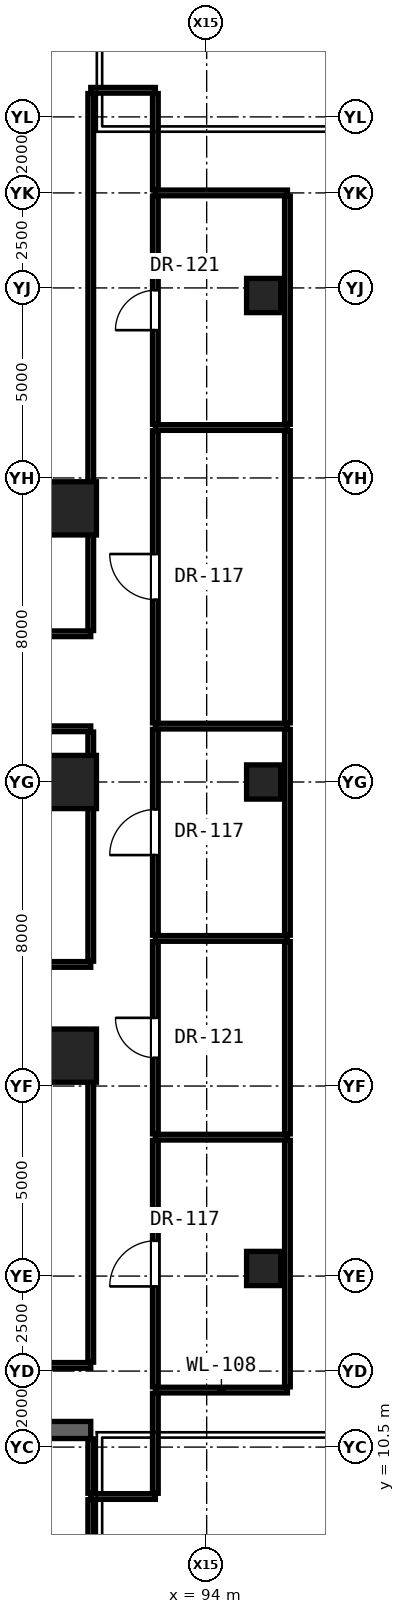
"""IFC4 building model, lengths in metres.
Left out: names, types, materials, properties, quantities, classifications, styles, units other than length and angle.
Written with IfcOpenShell. Run it as: python <this file> out.ifc"""

import sys

from ifc_helpers import new_model, si_unit, direction, frame, frame_2d, origin, origin_2d, place, context, subcontext, project, spatial, rectangle, hollow_rectangle, extrude, element, fill, save


model = new_model("IFC4")
c1 = context("Model", 3, precision=1e-05, world=origin(), true_north=direction((0.0, 1.0)))
c2 = subcontext(c1, "Body", "Model", "MODEL_VIEW")
j1 = project(units=[si_unit("LENGTHUNIT", "METRE"), si_unit("PLANEANGLEUNIT", "RADIAN")], contexts=[c1])
p1 = place(None, origin())
s1 = spatial("IfcSite", under=j1, at=p1, CompositionType="ELEMENT")
p2 = place(p1, origin())
s2 = spatial("IfcBuilding", under=s1, at=p2, CompositionType="ELEMENT")
p3 = place(p2, frame((0.0, 0.0, 13.8)))
s3 = spatial("IfcBuildingStorey", under=s2, at=p3, CompositionType="ELEMENT", Elevation=13.8)
for number, where, z_axis, x_axis in (
    (1, (90.4, 20.8, 0.0), (0.0, 0.0, 1.0), (1.0, 0.0, 0.0)),
    (2, (90.4, 28.0, 0.0), (0.0, 0.0, 1.0), (1.0, 0.0, 0.0)),
    (3, (90.4, 35.2, 0.0), (0.0, 0.0, 1.0), (1.0, 0.0, 0.0)),
):
    element("IfcColumn", number, at=place(p3, frame(where, z_axis=z_axis, x_axis=x_axis)), inside=s3, PredefinedType="COLUMN", context=c2, shape_type="SweptSolid", body=[
        extrude(hollow_rectangle(XDim=1.4, YDim=1.4, WallThickness=0.08, at=origin_2d()), origin(), (0.0, 0.0, 1.0), 4.3),
    ])
for number, where, z_axis, x_axis in (
    (4, (95.5, 15.2, 0.0), (0.0, 0.0, 1.0), (1.0, 0.0, 0.0)),
    (5, (95.5, 28.0, 0.0), (0.0, 0.0, 1.0), (1.0, 0.0, 0.0)),
    (6, (95.5, 40.8, 0.0), (0.0, 0.0, 1.0), (1.0, 0.0, 0.0)),
):
    element("IfcColumn", number, at=place(p3, frame(where, z_axis=z_axis, x_axis=x_axis)), inside=s3, PredefinedType="COLUMN", context=c2, shape_type="SweptSolid", body=[
        extrude(rectangle(XDim=0.9, YDim=0.9, at=origin_2d()), origin(), (0.0, 0.0, 1.0), 4.3),
    ])
p4 = place(p3, frame((90.95, 9.2, 0.0), z_axis=(0.0, 0.0, 1.0), x_axis=(1.0, 0.0, 0.0)))
e7 = element("IfcWall", 7, at=p4, inside=s3, PredefinedType="PARTITIONING", context=c2, shape_type="SweptSolid", body=[
    extrude(rectangle(XDim=1.7, YDim=0.15, at=frame_2d((0.85, 0.0))), origin(), (0.0, 0.0, 1.0), 3.65),
])
p5 = place(p3, frame((61.8, 10.95, 0.0), z_axis=(0.0, 0.0, 1.0), x_axis=(1.0, 0.0, 0.0)))
e8 = element("IfcWall", 8, at=p5, inside=s3, PredefinedType="SHEAR", context=c2, shape_type="SweptSolid", body=[
    extrude(rectangle(XDim=29.15, YDim=0.45, at=frame_2d((14.575, 0.0))), origin(), (0.0, 0.0, 1.0), 3.65),
])
p6 = place(p5, frame((7.57, 0.0, 0.0)))
e9 = element("IfcOpeningElement", 9, at=p6, cuts=e8, PredefinedType="OPENING", context=c2, shape_type="SweptSolid", body=[
    extrude(rectangle(XDim=1.15, YDim=2.2, at=frame_2d((0.575, 1.1))), frame((0.0, 0.235, 0.0), z_axis=(0.0, -1.0, 0.0), x_axis=(1.0, 0.0, 0.0)), (0.0, 0.0, 1.0), 0.47),
])
p7 = place(p5, frame((21.63, 0.0, 0.0)))
e10 = element("IfcOpeningElement", 10, at=p7, cuts=e8, PredefinedType="OPENING", context=c2, shape_type="SweptSolid", body=[
    extrude(rectangle(XDim=1.05, YDim=2.2, at=frame_2d((0.525, 1.1))), frame((0.0, 0.235, 0.0), z_axis=(0.0, -1.0, 0.0), x_axis=(1.0, 0.0, 0.0)), (0.0, 0.0, 1.0), 0.47),
])
p8 = place(p3, frame((92.65, 12.0, 0.0), z_axis=(0.0, 0.0, 1.0), x_axis=(1.0, 0.0, 0.0)))
e11 = element("IfcWall", 11, at=p8, inside=s3, PredefinedType="PARTITIONING", context=c2, shape_type="SweptSolid", body=[
    extrude(rectangle(XDim=3.475, YDim=0.15, at=frame_2d((1.738, 0.0))), origin(), (0.0, 0.0, 1.0), 3.65),
])
p9 = place(p3, frame((61.8, 12.65, 0.0), z_axis=(0.0, 0.0, 1.0), x_axis=(1.0, 0.0, 0.0)))
e12 = element("IfcWall", 12, at=p9, inside=s3, PredefinedType="PARTITIONING", context=c2, shape_type="SweptSolid", body=[
    extrude(rectangle(XDim=29.15, YDim=0.15, at=frame_2d((14.575, 0.0))), origin(), (0.0, 0.0, 1.0), 2.786),
])
p10 = place(p3, frame((92.65, 18.655, 0.0), z_axis=(0.0, 0.0, 1.0), x_axis=(1.0, 0.0, 0.0)))
e13 = element("IfcWall", 13, at=p10, inside=s3, PredefinedType="PARTITIONING", context=c2, shape_type="SweptSolid", body=[
    extrude(rectangle(XDim=3.475, YDim=0.15, at=frame_2d((1.738, 0.0))), origin(), (0.0, 0.0, 1.0), 2.786),
])
p11 = place(p3, frame((85.37, 20.8, 0.0), z_axis=(0.0, 0.0, 1.0), x_axis=(1.0, 0.0, 0.0)))
e14 = element("IfcWall", 14, at=p11, inside=s3, PredefinedType="PARTITIONING", context=c2, shape_type="SweptSolid", body=[
    extrude(rectangle(XDim=5.58, YDim=0.15, at=frame_2d((2.79, 0.0))), origin(), (0.0, 0.0, 1.0), 2.542),
])
p12 = place(p3, frame((61.8, 23.2, 0.0), z_axis=(0.0, 0.0, 1.0), x_axis=(1.0, 0.0, 0.0)))
e15 = element("IfcWall", 15, at=p12, inside=s3, PredefinedType="PARTITIONING", context=c2, shape_type="SweptSolid", body=[
    extrude(rectangle(XDim=29.15, YDim=0.15, at=frame_2d((14.575, 0.0))), origin(), (0.0, 0.0, 1.0), 2.715),
])
p13 = place(p12, frame((6.225, 0.0, 0.0)))
e16 = element("IfcOpeningElement", 16, at=p13, cuts=e15, PredefinedType="OPENING", context=c2, shape_type="SweptSolid", body=[
    extrude(rectangle(XDim=0.9, YDim=2.1, at=frame_2d((0.45, 1.05))), frame((0.0, 0.085, 0.0), z_axis=(0.0, -1.0, 0.0), x_axis=(1.0, 0.0, 0.0)), (0.0, 0.0, 1.0), 0.17),
])
p14 = place(p12, frame((10.824, 0.0, 0.0)))
e17 = element("IfcOpeningElement", 17, at=p14, cuts=e15, PredefinedType="OPENING", context=c2, shape_type="SweptSolid", body=[
    extrude(rectangle(XDim=1.05, YDim=2.2, at=frame_2d((0.525, 1.1))), frame((0.0, 0.085, 0.0), z_axis=(0.0, -1.0, 0.0), x_axis=(1.0, 0.0, 0.0)), (0.0, 0.0, 1.0), 0.17),
])
p15 = place(p3, frame((92.65, 23.884, 0.0), z_axis=(0.0, 0.0, 1.0), x_axis=(1.0, 0.0, 0.0)))
e18 = element("IfcWall", 18, at=p15, inside=s3, PredefinedType="PARTITIONING", context=c2, shape_type="SweptSolid", body=[
    extrude(rectangle(XDim=3.475, YDim=0.15, at=frame_2d((1.738, 0.0))), origin(), (0.0, 0.0, 1.0), 2.786),
])
p16 = place(p3, frame((85.22, 29.4, 0.0), z_axis=(0.0, 0.0, 1.0), x_axis=(1.0, 0.0, 0.0)))
e19 = element("IfcWall", 19, at=p16, inside=s3, PredefinedType="PARTITIONING", context=c2, shape_type="SweptSolid", body=[
    extrude(rectangle(XDim=5.73, YDim=0.15, at=frame_2d((2.865, 0.0))), origin(), (0.0, 0.0, 1.0), 2.786),
])
p17 = place(p3, frame((92.65, 29.47, 0.0), z_axis=(0.0, 0.0, 1.0), x_axis=(1.0, 0.0, 0.0)))
e20 = element("IfcWall", 20, at=p17, inside=s3, PredefinedType="PARTITIONING", context=c2, shape_type="SweptSolid", body=[
    extrude(rectangle(XDim=3.475, YDim=0.15, at=frame_2d((1.738, 0.0))), origin(), (0.0, 0.0, 1.0), 2.786),
])
p18 = place(p3, frame((72.85, 31.9, 0.0), z_axis=(0.0, 0.0, 1.0), x_axis=(1.0, 0.0, 0.0)))
e21 = element("IfcWall", 21, at=p18, inside=s3, PredefinedType="PARTITIONING", context=c2, shape_type="SweptSolid", body=[
    extrude(rectangle(XDim=18.1, YDim=0.15, at=frame_2d((9.05, 0.0))), origin(), (0.0, 0.0, 1.0), 2.715),
])
p19 = place(p18, frame((9.21, 0.0, 0.0)))
e22 = element("IfcOpeningElement", 22, at=p19, cuts=e21, PredefinedType="OPENING", context=c2, shape_type="SweptSolid", body=[
    extrude(rectangle(XDim=1.2, YDim=2.25, at=frame_2d((0.6, 1.125))), frame((0.0, 0.085, 0.0), z_axis=(0.0, -1.0, 0.0), x_axis=(1.0, 0.0, 0.0)), (0.0, 0.0, 1.0), 0.17),
])
p20 = place(p18, frame((4.59, 0.0, 0.0)))
e23 = element("IfcOpeningElement", 23, at=p20, cuts=e21, PredefinedType="OPENING", context=c2, shape_type="SweptSolid", body=[
    extrude(rectangle(XDim=1.2, YDim=2.25, at=frame_2d((0.6, 1.125))), frame((0.0, 0.085, 0.0), z_axis=(0.0, -1.0, 0.0), x_axis=(1.0, 0.0, 0.0)), (0.0, 0.0, 1.0), 0.17),
])
p21 = place(p3, frame((92.65, 37.327, 0.0), z_axis=(0.0, 0.0, 1.0), x_axis=(1.0, 0.0, 0.0)))
e24 = element("IfcWall", 24, at=p21, inside=s3, PredefinedType="PARTITIONING", context=c2, shape_type="SweptSolid", body=[
    extrude(rectangle(XDim=3.475, YDim=0.15, at=frame_2d((1.738, 0.0))), origin(), (0.0, 0.0, 1.0), 2.786),
])
p22 = place(p3, frame((92.65, 43.5, 0.0), z_axis=(0.0, 0.0, 1.0), x_axis=(1.0, 0.0, 0.0)))
e25 = element("IfcWall", 25, at=p22, inside=s3, PredefinedType="PARTITIONING", context=c2, shape_type="SweptSolid", body=[
    extrude(rectangle(XDim=3.475, YDim=0.15, at=frame_2d((1.738, 0.0))), origin(), (0.0, 0.0, 1.0), 3.65),
])
p23 = place(p3, frame((90.95, 46.2, 0.0), z_axis=(0.0, 0.0, 1.0), x_axis=(1.0, 0.0, 0.0)))
e26 = element("IfcWall", 26, at=p23, inside=s3, PredefinedType="PARTITIONING", context=c2, shape_type="SweptSolid", body=[
    extrude(rectangle(XDim=1.7, YDim=0.15, at=frame_2d((0.85, 0.0))), origin(), (0.0, 0.0, 1.0), 3.65),
])
p24 = place(p3, frame((90.95, 6.935, 0.0), z_axis=(0.0, 0.0, 1.0), x_axis=(0.0, 1.0, 0.0)))
e27 = element("IfcWall", 27, at=p24, inside=s3, PredefinedType="PARTITIONING", context=c2, shape_type="SweptSolid", body=[
    extrude(rectangle(XDim=2.18, YDim=0.15, at=frame_2d((1.09, 0.0))), origin(), (0.0, 0.0, 1.0), 3.65),
])
p25 = place(p3, frame((90.95, 9.285, 0.0), z_axis=(0.0, 0.0, 1.0), x_axis=(0.0, 1.0, 0.0)))
e28 = element("IfcWall", 28, at=p25, inside=s3, PredefinedType="PARTITIONING", context=c2, shape_type="SweptSolid", body=[
    extrude(rectangle(XDim=1.43, YDim=0.15, at=frame_2d((0.715, 0.0))), origin(), (0.0, 0.0, 1.0), 3.65),
])
p26 = place(p3, frame((90.95, 12.735, 0.0), z_axis=(0.0, 0.0, 1.0), x_axis=(0.0, 1.0, 0.0)))
e29 = element("IfcWall", 29, at=p26, inside=s3, PredefinedType="PARTITIONING", context=c2, shape_type="SweptSolid", body=[
    extrude(rectangle(XDim=7.98, YDim=0.15, at=frame_2d((3.99, 0.0))), origin(), (0.0, 0.0, 1.0), 2.786),
])
p27 = place(p3, frame((90.95, 23.285, 0.0), z_axis=(0.0, 0.0, 1.0), x_axis=(0.0, 1.0, 0.0)))
e30 = element("IfcWall", 30, at=p27, inside=s3, PredefinedType="PARTITIONING", context=c2, shape_type="SweptSolid", body=[
    extrude(rectangle(XDim=6.03, YDim=0.15, at=frame_2d((3.015, 0.0))), origin(), (0.0, 0.0, 1.0), 2.869),
])
p28 = place(p3, frame((90.95, 31.985, 0.0), z_axis=(0.0, 0.0, 1.0), x_axis=(0.0, 1.0, 0.0)))
e31 = element("IfcWall", 31, at=p28, inside=s3, PredefinedType="PARTITIONING", context=c2, shape_type="SweptSolid", body=[
    extrude(rectangle(XDim=14.13, YDim=0.15, at=frame_2d((7.065, 0.0))), origin(), (0.0, 0.0, 1.0), 2.786),
])
p29 = place(p3, frame((92.65, 9.285, 0.0), z_axis=(0.0, 0.0, 1.0), x_axis=(0.0, 1.0, 0.0)))
e32 = element("IfcWall", 32, at=p29, inside=s3, PredefinedType="PARTITIONING", context=c2, shape_type="SweptSolid", body=[
    extrude(rectangle(XDim=2.63, YDim=0.15, at=frame_2d((1.315, 0.0))), origin(), (0.0, 0.0, 1.0), 3.65),
])
p30 = place(p3, frame((92.65, 12.085, 0.0), z_axis=(0.0, 0.0, 1.0), x_axis=(0.0, 1.0, 0.0)))
e33 = element("IfcWall", 33, at=p30, inside=s3, PredefinedType="PARTITIONING", context=c2, shape_type="SweptSolid", body=[
    extrude(rectangle(XDim=6.485, YDim=0.15, at=frame_2d((3.243, 0.0))), origin(), (0.0, 0.0, 1.0), 2.786),
])
p31 = place(p30, frame((2.643, 0.0, 0.0)))
e34 = element("IfcOpeningElement", 34, at=p31, cuts=e33, PredefinedType="OPENING", context=c2, shape_type="SweptSolid", body=[
    extrude(rectangle(XDim=1.2, YDim=2.25, at=frame_2d((0.6, 1.125))), frame((0.0, 0.085, 0.0), z_axis=(0.0, -1.0, 0.0), x_axis=(1.0, 0.0, 0.0)), (0.0, 0.0, 1.0), 0.17),
])
p32 = place(p3, frame((92.65, 18.74, 0.0), z_axis=(0.0, 0.0, 1.0), x_axis=(0.0, 1.0, 0.0)))
e35 = element("IfcWall", 35, at=p32, inside=s3, PredefinedType="PARTITIONING", context=c2, shape_type="SweptSolid", body=[
    extrude(rectangle(XDim=5.059, YDim=0.15, at=frame_2d((2.53, 0.0))), origin(), (0.0, 0.0, 1.0), 3.65),
])
p33 = place(p32, frame((2.004, 0.0, 0.0)))
e36 = element("IfcOpeningElement", 36, at=p33, cuts=e35, PredefinedType="OPENING", context=c2, shape_type="SweptSolid", body=[
    extrude(rectangle(XDim=1.05, YDim=2.2, at=frame_2d((0.525, 1.1))), frame((0.0, 0.085, 0.0), z_axis=(0.0, -1.0, 0.0), x_axis=(1.0, 0.0, 0.0)), (0.0, 0.0, 1.0), 0.17),
])
p34 = place(p3, frame((92.65, 23.969, 0.0), z_axis=(0.0, 0.0, 1.0), x_axis=(0.0, 1.0, 0.0)))
e37 = element("IfcWall", 37, at=p34, inside=s3, PredefinedType="PARTITIONING", context=c2, shape_type="SweptSolid", body=[
    extrude(rectangle(XDim=5.416, YDim=0.15, at=frame_2d((2.708, 0.0))), origin(), (0.0, 0.0, 1.0), 2.869),
])
p35 = place(p34, frame((2.108, 0.0, 0.0)))
e38 = element("IfcOpeningElement", 38, at=p35, cuts=e37, PredefinedType="OPENING", context=c2, shape_type="SweptSolid", body=[
    extrude(rectangle(XDim=1.2, YDim=2.25, at=frame_2d((0.6, 1.125))), frame((0.0, 0.085, 0.0), z_axis=(0.0, -1.0, 0.0), x_axis=(1.0, 0.0, 0.0)), (0.0, 0.0, 1.0), 0.17),
])
p36 = place(p3, frame((92.65, 29.555, 0.0), z_axis=(0.0, 0.0, 1.0), x_axis=(0.0, 1.0, 0.0)))
e39 = element("IfcWall", 39, at=p36, inside=s3, PredefinedType="PARTITIONING", context=c2, shape_type="SweptSolid", body=[
    extrude(rectangle(XDim=7.687, YDim=0.15, at=frame_2d((3.844, 0.0))), origin(), (0.0, 0.0, 1.0), 3.65),
])
p37 = place(p36, frame((3.243, 0.0, 0.0)))
e40 = element("IfcOpeningElement", 40, at=p37, cuts=e39, PredefinedType="OPENING", context=c2, shape_type="SweptSolid", body=[
    extrude(rectangle(XDim=1.2, YDim=2.25, at=frame_2d((0.6, 1.125))), frame((0.0, 0.085, 0.0), z_axis=(0.0, -1.0, 0.0), x_axis=(1.0, 0.0, 0.0)), (0.0, 0.0, 1.0), 0.17),
])
p38 = place(p3, frame((92.65, 37.412, 0.0), z_axis=(0.0, 0.0, 1.0), x_axis=(0.0, 1.0, 0.0)))
e41 = element("IfcWall", 41, at=p38, inside=s3, PredefinedType="PARTITIONING", context=c2, shape_type="SweptSolid", body=[
    extrude(rectangle(XDim=6.003, YDim=0.15, at=frame_2d((3.001, 0.0))), origin(), (0.0, 0.0, 1.0), 2.786),
])
p39 = place(p38, frame((2.477, 0.0, 0.0)))
e42 = element("IfcOpeningElement", 42, at=p39, cuts=e41, PredefinedType="OPENING", context=c2, shape_type="SweptSolid", body=[
    extrude(rectangle(XDim=1.05, YDim=2.2, at=frame_2d((0.525, 1.1))), frame((0.0, 0.085, 0.0), z_axis=(0.0, -1.0, 0.0), x_axis=(1.0, 0.0, 0.0)), (0.0, 0.0, 1.0), 0.17),
])
p40 = place(p3, frame((92.65, 43.585, 0.0), z_axis=(0.0, 0.0, 1.0), x_axis=(0.0, 1.0, 0.0)))
e43 = element("IfcWall", 43, at=p40, inside=s3, PredefinedType="PARTITIONING", context=c2, shape_type="SweptSolid", body=[
    extrude(rectangle(XDim=2.53, YDim=0.15, at=frame_2d((1.265, 0.0))), origin(), (0.0, 0.0, 1.0), 3.65),
])
p41 = place(p3, frame((96.125, 12.085, 0.0), z_axis=(0.0, 0.0, 1.0), x_axis=(0.0, 1.0, 0.0)))
e44 = element("IfcWall", 44, at=p41, inside=s3, PredefinedType="PARTITIONING", context=c2, shape_type="SweptSolid", body=[
    extrude(rectangle(XDim=6.485, YDim=0.15, at=frame_2d((3.243, 0.0))), origin(), (0.0, 0.0, 1.0), 3.65),
])
p42 = place(p3, frame((96.125, 18.74, 0.0), z_axis=(0.0, 0.0, 1.0), x_axis=(0.0, 1.0, 0.0)))
e45 = element("IfcWall", 45, at=p42, inside=s3, PredefinedType="PARTITIONING", context=c2, shape_type="SweptSolid", body=[
    extrude(rectangle(XDim=5.059, YDim=0.15, at=frame_2d((2.53, 0.0))), origin(), (0.0, 0.0, 1.0), 3.65),
])
p43 = place(p3, frame((96.125, 23.969, 0.0), z_axis=(0.0, 0.0, 1.0), x_axis=(0.0, 1.0, 0.0)))
e46 = element("IfcWall", 46, at=p43, inside=s3, PredefinedType="PARTITIONING", context=c2, shape_type="SweptSolid", body=[
    extrude(rectangle(XDim=5.416, YDim=0.15, at=frame_2d((2.708, 0.0))), origin(), (0.0, 0.0, 1.0), 3.65),
])
p44 = place(p3, frame((96.125, 29.555, 0.0), z_axis=(0.0, 0.0, 1.0), x_axis=(0.0, 1.0, 0.0)))
e47 = element("IfcWall", 47, at=p44, inside=s3, PredefinedType="PARTITIONING", context=c2, shape_type="SweptSolid", body=[
    extrude(rectangle(XDim=7.687, YDim=0.15, at=frame_2d((3.844, 0.0))), origin(), (0.0, 0.0, 1.0), 3.65),
])
p45 = place(p3, frame((96.125, 37.412, 0.0), z_axis=(0.0, 0.0, 1.0), x_axis=(0.0, 1.0, 0.0)))
e48 = element("IfcWall", 48, at=p45, inside=s3, PredefinedType="PARTITIONING", context=c2, shape_type="SweptSolid", body=[
    extrude(rectangle(XDim=6.003, YDim=0.15, at=frame_2d((3.001, 0.0))), origin(), (0.0, 0.0, 1.0), 3.65),
])
p46 = place(p31, origin())
e49 = element("IfcDoor", 49, at=p46, inside=s3, OperationType="SINGLE_SWING_LEFT", PredefinedType="DOOR", context=c2, shape_type="SweptSolid", body=[
    extrude(rectangle(XDim=1.2, YDim=2.25, at=frame_2d((0.6, 1.125))), frame((0.0, 0.025, 0.0), z_axis=(0.0, -1.0, 0.0), x_axis=(1.0, 0.0, 0.0)), (0.0, 0.0, 1.0), 0.05),
])
fill(e34, e49)
p47 = place(p33, origin())
e50 = element("IfcDoor", 50, at=p47, inside=s3, OperationType="SINGLE_SWING_RIGHT", PredefinedType="DOOR", context=c2, shape_type="SweptSolid", body=[
    extrude(rectangle(XDim=1.05, YDim=2.2, at=frame_2d((0.525, 1.1))), frame((0.0, 0.025, 0.0), z_axis=(0.0, -1.0, 0.0), x_axis=(1.0, 0.0, 0.0)), (0.0, 0.0, 1.0), 0.05),
])
fill(e36, e50)
p48 = place(p35, origin())
e51 = element("IfcDoor", 51, at=p48, inside=s3, OperationType="SINGLE_SWING_LEFT", PredefinedType="DOOR", context=c2, shape_type="SweptSolid", body=[
    extrude(rectangle(XDim=1.2, YDim=2.25, at=frame_2d((0.6, 1.125))), frame((0.0, 0.025, 0.0), z_axis=(0.0, -1.0, 0.0), x_axis=(1.0, 0.0, 0.0)), (0.0, 0.0, 1.0), 0.05),
])
fill(e38, e51)
p49 = place(p37, origin())
e52 = element("IfcDoor", 52, at=p49, inside=s3, OperationType="SINGLE_SWING_RIGHT", PredefinedType="DOOR", context=c2, shape_type="SweptSolid", body=[
    extrude(rectangle(XDim=1.2, YDim=2.25, at=frame_2d((0.6, 1.125))), frame((0.0, 0.025, 0.0), z_axis=(0.0, -1.0, 0.0), x_axis=(1.0, 0.0, 0.0)), (0.0, 0.0, 1.0), 0.05),
])
fill(e40, e52)
p50 = place(p39, origin())
e53 = element("IfcDoor", 53, at=p50, inside=s3, OperationType="SINGLE_SWING_LEFT", PredefinedType="DOOR", context=c2, shape_type="SweptSolid", body=[
    extrude(rectangle(XDim=1.05, YDim=2.2, at=frame_2d((0.525, 1.1))), frame((0.0, 0.025, 0.0), z_axis=(0.0, -1.0, 0.0), x_axis=(1.0, 0.0, 0.0)), (0.0, 0.0, 1.0), 0.05),
])
fill(e42, e53)
save(model, sys.argv[1])
